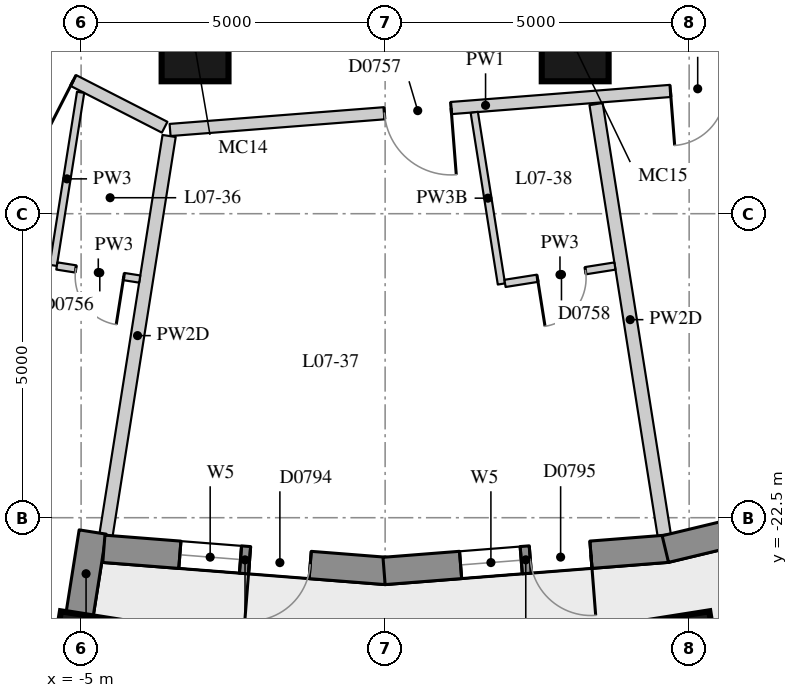
"""IFC4 building model, lengths in metres.
Left out: names, types, materials, properties, quantities, classifications, styles, units other than length and angle.
Written with IfcOpenShell. Run it as: python <this file> out.ifc"""

import sys

from ifc_helpers import new_model, si_unit, direction, frame, frame_2d, origin, origin_2d, place, context, subcontext, project, spatial, rectangle, extrude, element, fill, save


model = new_model("IFC4")
c1 = context("Model", 3, precision=1e-05, world=origin(), true_north=direction((0.0, 1.0)))
c2 = subcontext(c1, "Body", "Model", "MODEL_VIEW")
j1 = project(units=[si_unit("LENGTHUNIT", "METRE"), si_unit("PLANEANGLEUNIT", "RADIAN")], contexts=[c1])
p1 = place(None, origin())
s1 = spatial("IfcSite", under=j1, at=p1, CompositionType="ELEMENT")
p2 = place(p1, origin())
s2 = spatial("IfcBuilding", under=s1, at=p2, CompositionType="ELEMENT")
p3 = place(p2, frame((0.0, 0.0, 31.6)))
s3 = spatial("IfcBuildingStorey", under=s2, at=p3, CompositionType="ELEMENT", Elevation=31.6)
for number, where, z_axis, x_axis in (
    (1, (-4.906, -24.866, 0.0), (0.0, 0.0, 1.0), (-0.156, -0.988, 0.0)),
    (2, (4.906, -24.866, 0.0), (0.0, 0.0, 1.0), (0.156, -0.988, 0.0)),
):
    element("IfcColumn", number, at=place(p3, frame(where, z_axis=z_axis, x_axis=x_axis)), inside=s3, PredefinedType="COLUMN", context=c2, shape_type="SweptSolid", body=[
        extrude(rectangle(XDim=1.5, YDim=1.1, at=origin_2d()), origin(), (0.0, 0.0, 1.0), 3.3),
    ])
for number, where, z_axis, x_axis in (
    (3, (-3.126, -14.772, 0.0), (0.0, 0.0, 1.0), (1.0, 0.0, 0.0)),
    (4, (3.126, -14.772, 0.0), (0.0, 0.0, 1.0), (1.0, 0.0, 0.0)),
):
    element("IfcColumn", number, at=place(p3, frame(where, z_axis=z_axis, x_axis=x_axis)), inside=s3, PredefinedType="COLUMN", context=c2, shape_type="SweptSolid", body=[
        extrude(rectangle(XDim=1.1, YDim=1.1, at=origin_2d()), origin(), (0.0, 0.0, 1.0), 3.3),
    ])
p4 = place(p3, frame((-9.308, -24.35, 0.0), z_axis=(0.0, 0.0, 1.0), x_axis=(0.972496561493, -0.232917233979, 0.0)))
e5 = element("IfcWall", 5, at=p4, inside=s3, PredefinedType="SOLIDWALL", context=c2, shape_type="SweptSolid", body=[
    extrude(rectangle(XDim=3.911, YDim=0.45, at=frame_2d((1.956, 0.0))), origin(), (0.0, 0.0, 1.0), 3.02),
])
p5 = place(p4, frame((0.855, 0.0, 0.4)))
e6 = element("IfcOpeningElement", 6, at=p5, cuts=e5, PredefinedType="OPENING", context=c2, shape_type="SweptSolid", body=[
    extrude(rectangle(XDim=2.2, YDim=1.75, at=frame_2d((1.1, 0.875))), frame((0.0, 0.235, 0.0), z_axis=(0.0, -1.0, 0.0), x_axis=(1.0, 0.0, 0.0)), (0.0, 0.0, 1.0), 0.47),
])
p6 = place(p3, frame((-5.027, -24.108, 0.0), z_axis=(0.0, 0.0, 1.0), x_axis=(0.156133927791, 0.98773589415, 0.0)))
e7 = element("IfcWall", 7, at=p6, inside=s3, PredefinedType="SOLIDWALL", context=c2, shape_type="SweptSolid", body=[
    extrude(rectangle(XDim=1.39, YDim=0.45, at=frame_2d((0.695, 0.0))), origin(), (0.0, 0.0, 1.0), 2.47),
])
p7 = place(p3, frame((-4.626, -23.011, 0.0), z_axis=(0.0, 0.0, 1.0), x_axis=(0.996937095772, -0.078207589615, 0.0)))
e8 = element("IfcWall", 8, at=p7, inside=s3, PredefinedType="SOLIDWALL", context=c2, shape_type="SweptSolid", body=[
    extrude(rectangle(XDim=4.657, YDim=0.45, at=frame_2d((2.329, 0.0))), origin(), (0.0, 0.0, 1.0), 3.02),
])
p8 = place(p7, frame((1.254, 0.0, 0.4)))
e9 = element("IfcOpeningElement", 9, at=p8, cuts=e8, PredefinedType="OPENING", context=c2, shape_type="SweptSolid", body=[
    extrude(rectangle(XDim=1.0, YDim=1.75, at=frame_2d((0.5, 0.875))), frame((0.0, 0.235, 0.0), z_axis=(0.0, -1.0, 0.0), x_axis=(1.0, 0.0, 0.0)), (0.0, 0.0, 1.0), 0.47),
])
p9 = place(p7, frame((2.404, 0.0, 0.0)))
e10 = element("IfcOpeningElement", 10, at=p9, cuts=e8, PredefinedType="OPENING", context=c2, shape_type="SweptSolid", body=[
    extrude(rectangle(XDim=1.0, YDim=2.15, at=frame_2d((0.5, 1.075))), frame((0.0, 0.235, 0.0), z_axis=(0.0, -1.0, 0.0), x_axis=(1.0, 0.0, 0.0)), (0.0, 0.0, 1.0), 0.47),
])
p10 = place(p3, frame((-0.018, -23.376, 0.0), z_axis=(0.0, 0.0, 1.0), x_axis=(0.996935982964, 0.078221773648, 0.0)))
e11 = element("IfcWall", 11, at=p10, inside=s3, PredefinedType="SOLIDWALL", context=c2, shape_type="SweptSolid", body=[
    extrude(rectangle(XDim=4.676, YDim=0.45, at=frame_2d((2.338, 0.0))), origin(), (0.0, 0.0, 1.0), 3.02),
])
p11 = place(p10, frame((1.263, 0.0, 0.4)))
e12 = element("IfcOpeningElement", 12, at=p11, cuts=e11, PredefinedType="OPENING", context=c2, shape_type="SweptSolid", body=[
    extrude(rectangle(XDim=1.0, YDim=1.75, at=frame_2d((0.5, 0.875))), frame((0.0, 0.235, 0.0), z_axis=(0.0, -1.0, 0.0), x_axis=(1.0, 0.0, 0.0)), (0.0, 0.0, 1.0), 0.47),
])
p12 = place(p10, frame((2.413, 0.0, 0.0)))
e13 = element("IfcOpeningElement", 13, at=p12, cuts=e11, PredefinedType="OPENING", context=c2, shape_type="SweptSolid", body=[
    extrude(rectangle(XDim=1.0, YDim=2.15, at=frame_2d((0.5, 1.075))), frame((0.0, 0.235, 0.0), z_axis=(0.0, -1.0, 0.0), x_axis=(1.0, 0.0, 0.0)), (0.0, 0.0, 1.0), 0.47),
])
p13 = place(p3, frame((4.608, -23.016, 0.0), z_axis=(0.0, 0.0, 1.0), x_axis=(0.972343667289, 0.233554688847, 0.0)))
e14 = element("IfcWall", 14, at=p13, inside=s3, PredefinedType="SOLIDWALL", context=c2, shape_type="SweptSolid", body=[
    extrude(rectangle(XDim=4.624, YDim=0.45, at=frame_2d((2.312, 0.0))), origin(), (0.0, 0.0, 1.0), 3.02),
])
p14 = place(p13, frame((1.237, 0.0, 0.4)))
e15 = element("IfcOpeningElement", 15, at=p14, cuts=e14, PredefinedType="OPENING", context=c2, shape_type="SweptSolid", body=[
    extrude(rectangle(XDim=1.0, YDim=1.75, at=frame_2d((0.5, 0.875))), frame((0.0, 0.235, 0.0), z_axis=(0.0, -1.0, 0.0), x_axis=(1.0, 0.0, 0.0)), (0.0, 0.0, 1.0), 0.47),
])
p15 = place(p13, frame((2.387, 0.0, 0.0)))
e16 = element("IfcOpeningElement", 16, at=p15, cuts=e14, PredefinedType="OPENING", context=c2, shape_type="SweptSolid", body=[
    extrude(rectangle(XDim=1.0, YDim=2.15, at=frame_2d((0.5, 1.075))), frame((0.0, 0.235, 0.0), z_axis=(0.0, -1.0, 0.0), x_axis=(1.0, 0.0, 0.0)), (0.0, 0.0, 1.0), 0.47),
])
p16 = place(p3, frame((6.84, -15.313, 0.0), z_axis=(0.0, 0.0, 1.0), x_axis=(-0.996968882229, -0.077801335898, 0.0)))
e17 = element("IfcWall", 17, at=p16, inside=s3, PredefinedType="PARTITIONING", context=c2, shape_type="SweptSolid", body=[
    extrude(rectangle(XDim=10.409, YDim=0.2, at=frame_2d((5.204, 0.0))), origin(), (0.0, 0.0, 1.0), 3.02),
])
p17 = place(p16, frame((5.773, 0.0, 0.0)))
e18 = element("IfcOpeningElement", 18, at=p17, cuts=e17, PredefinedType="OPENING", context=c2, shape_type="SweptSolid", body=[
    extrude(rectangle(XDim=1.1, YDim=2.1, at=frame_2d((0.55, 1.05))), frame((0.0, 0.11, 0.0), z_axis=(0.0, -1.0, 0.0), x_axis=(1.0, 0.0, 0.0)), (0.0, 0.0, 1.0), 0.22),
])
p18 = place(p16, frame((1.255, 0.0, 0.0)))
e19 = element("IfcOpeningElement", 19, at=p18, cuts=e17, PredefinedType="OPENING", context=c2, shape_type="SweptSolid", body=[
    extrude(rectangle(XDim=0.9, YDim=2.1, at=frame_2d((0.45, 1.05))), frame((0.0, 0.11, 0.0), z_axis=(0.0, -1.0, 0.0), x_axis=(1.0, 0.0, 0.0)), (0.0, 0.0, 1.0), 0.22),
])
p19 = place(p3, frame((-3.626, -16.078, 0.0), z_axis=(0.0, 0.0, 1.0), x_axis=(-0.890197807844, 0.455574212297, 0.0)))
e20 = element("IfcWall", 20, at=p19, inside=s3, PredefinedType="PARTITIONING", context=c2, shape_type="SweptSolid", body=[
    extrude(rectangle(XDim=4.801, YDim=0.2, at=frame_2d((2.4, 0.0))), origin(), (0.0, 0.0, 1.0), 2.57),
])
p20 = place(p19, frame((1.688, 0.0, 0.0)))
e21 = element("IfcOpeningElement", 21, at=p20, cuts=e20, PredefinedType="OPENING", context=c2, shape_type="SweptSolid", body=[
    extrude(rectangle(XDim=1.0, YDim=2.1, at=frame_2d((0.5, 1.05))), frame((0.0, 0.11, 0.0), z_axis=(0.0, -1.0, 0.0), x_axis=(1.0, 0.0, 0.0)), (0.0, 0.0, 1.0), 0.22),
])
p21 = place(p3, frame((-4.591, -22.789, 0.0), z_axis=(0.0, 0.0, 1.0), x_axis=(0.156104000092, 0.987740624433, 0.0)))
e22 = element("IfcWall", 22, at=p21, inside=s3, PredefinedType="PARTITIONING", context=c2, shape_type="SweptSolid", body=[
    extrude(rectangle(XDim=6.648, YDim=0.22, at=frame_2d((3.324, 0.0))), origin(), (0.0, 0.0, 1.0), 2.47),
])
p22 = place(p3, frame((4.591, -22.789, 0.0), z_axis=(0.0, 0.0, 1.0), x_axis=(-0.156144168019, 0.987734275397, 0.0)))
e23 = element("IfcWall", 23, at=p22, inside=s3, PredefinedType="PARTITIONING", context=c2, shape_type="SweptSolid", body=[
    extrude(rectangle(XDim=7.18, YDim=0.22, at=frame_2d((3.59, 0.0))), origin(), (0.0, 0.0, 1.0), 2.47),
])
p23 = place(p3, frame((-5.008, -15.504, 0.0), z_axis=(0.0, 0.0, 1.0), x_axis=(-0.156219239615, -0.987722404917, 0.0)))
e24 = element("IfcWall", 24, at=p23, inside=s3, PredefinedType="PARTITIONING", context=c2, shape_type="SweptSolid", body=[
    extrude(rectangle(XDim=2.882, YDim=0.12, at=frame_2d((1.441, 0.0))), origin(), (0.0, 0.0, 1.0), 3.02),
])
p24 = place(p3, frame((1.466, -15.833, 0.0), z_axis=(0.0, 0.0, 1.0), x_axis=(0.156164367571, -0.987731081976, 0.0)))
e25 = element("IfcWall", 25, at=p24, inside=s3, PredefinedType="PARTITIONING", context=c2, shape_type="SweptSolid", body=[
    extrude(rectangle(XDim=2.858, YDim=0.12, at=frame_2d((1.429, 0.0))), origin(), (0.0, 0.0, 1.0), 2.47),
])
p25 = place(p3, frame((-5.399, -18.359, 0.0), z_axis=(0.0, 0.0, 1.0), x_axis=(0.987722767831, -0.156216945011, 0.0)))
e26 = element("IfcWall", 26, at=p25, inside=s3, PredefinedType="PARTITIONING", context=c2, shape_type="SweptSolid", body=[
    extrude(rectangle(XDim=1.38, YDim=0.12, at=frame_2d((0.69, 0.0))), origin(), (0.0, 0.0, 1.0), 3.02),
])
p26 = place(p25, frame((0.315, 0.0, 0.0)))
e27 = element("IfcOpeningElement", 27, at=p26, cuts=e26, PredefinedType="OPENING", context=c2, shape_type="SweptSolid", body=[
    extrude(rectangle(XDim=0.8, YDim=2.1, at=frame_2d((0.4, 1.05))), frame((0.0, 0.07, 0.0), z_axis=(0.0, -1.0, 0.0), x_axis=(1.0, 0.0, 0.0)), (0.0, 0.0, 1.0), 0.14),
])
p27 = place(p3, frame((1.972, -18.646, 0.0), z_axis=(0.0, 0.0, 1.0), x_axis=(0.98774348746, 0.156085883351, 0.0)))
e28 = element("IfcWall", 28, at=p27, inside=s3, PredefinedType="PARTITIONING", context=c2, shape_type="SweptSolid", body=[
    extrude(rectangle(XDim=1.83, YDim=0.12, at=frame_2d((0.915, 0.0))), origin(), (0.0, 0.0, 1.0), 3.02),
])
p28 = place(p27, frame((0.54, 0.0, 0.0)))
e29 = element("IfcOpeningElement", 29, at=p28, cuts=e28, PredefinedType="OPENING", context=c2, shape_type="SweptSolid", body=[
    extrude(rectangle(XDim=0.8, YDim=2.1, at=frame_2d((0.4, 1.05))), frame((0.0, 0.07, 0.0), z_axis=(0.0, -1.0, 0.0), x_axis=(1.0, 0.0, 0.0)), (0.0, 0.0, 1.0), 0.14),
])
p29 = place(p8, origin())
e30 = element("IfcWindow", 30, at=p29, inside=s3, PartitioningType="SINGLE_PANEL", PredefinedType="WINDOW", context=c2, shape_type="SweptSolid", body=[
    extrude(rectangle(XDim=1.0, YDim=1.75, at=frame_2d((0.5, 0.875))), frame((0.0, 0.035, 0.0), z_axis=(0.0, -1.0, 0.0), x_axis=(1.0, 0.0, 0.0)), (0.0, 0.0, 1.0), 0.06),
])
fill(e9, e30)
p30 = place(p9, frame((1.0, 0.0, 0.0), z_axis=(0.0, 0.0, 1.0), x_axis=(-1.0, 0.0, 0.0)))
e31 = element("IfcDoor", 31, at=p30, inside=s3, OperationType="SINGLE_SWING_RIGHT", PredefinedType="DOOR", context=c2, shape_type="SweptSolid", body=[
    extrude(rectangle(XDim=1.0, YDim=2.15, at=frame_2d((0.5, 1.075))), frame((0.0, 0.075, 0.0), z_axis=(0.0, -1.0, 0.0), x_axis=(1.0, 0.0, 0.0)), (0.0, 0.0, 1.0), 0.05),
])
fill(e10, e31)
p31 = place(p11, origin())
e32 = element("IfcWindow", 32, at=p31, inside=s3, PartitioningType="SINGLE_PANEL", PredefinedType="WINDOW", context=c2, shape_type="SweptSolid", body=[
    extrude(rectangle(XDim=1.0, YDim=1.75, at=frame_2d((0.5, 0.875))), frame((0.0, 0.035, 0.0), z_axis=(0.0, -1.0, 0.0), x_axis=(1.0, 0.0, 0.0)), (0.0, 0.0, 1.0), 0.06),
])
fill(e12, e32)
p32 = place(p12, frame((1.0, 0.0, 0.0), z_axis=(0.0, 0.0, 1.0), x_axis=(-1.0, 0.0, 0.0)))
e33 = element("IfcDoor", 33, at=p32, inside=s3, OperationType="SINGLE_SWING_LEFT", PredefinedType="DOOR", context=c2, shape_type="SweptSolid", body=[
    extrude(rectangle(XDim=1.0, YDim=2.15, at=frame_2d((0.5, 1.075))), frame((0.0, 0.075, 0.0), z_axis=(0.0, -1.0, 0.0), x_axis=(1.0, 0.0, 0.0)), (0.0, 0.0, 1.0), 0.05),
])
fill(e13, e33)
p33 = place(p20, origin())
e34 = element("IfcDoor", 34, at=p33, inside=s3, OperationType="SINGLE_SWING_LEFT", PredefinedType="DOOR", context=c2, shape_type="SweptSolid", body=[
    extrude(rectangle(XDim=1.0, YDim=2.1, at=frame_2d((0.5, 1.05))), frame((0.0, 0.025, 0.0), z_axis=(0.0, -1.0, 0.0), x_axis=(1.0, 0.0, 0.0)), (0.0, 0.0, 1.0), 0.05),
])
fill(e21, e34)
p34 = place(p26, origin())
e35 = element("IfcDoor", 35, at=p34, inside=s3, OperationType="SINGLE_SWING_LEFT", PredefinedType="DOOR", context=c2, shape_type="SweptSolid", body=[
    extrude(rectangle(XDim=0.8, YDim=2.1, at=frame_2d((0.4, 1.05))), frame((0.0, 0.025, 0.0), z_axis=(0.0, -1.0, 0.0), x_axis=(1.0, 0.0, 0.0)), (0.0, 0.0, 1.0), 0.05),
])
fill(e27, e35)
p35 = place(p17, origin())
e36 = element("IfcDoor", 36, at=p35, inside=s3, OperationType="SINGLE_SWING_LEFT", PredefinedType="DOOR", context=c2, shape_type="SweptSolid", body=[
    extrude(rectangle(XDim=1.1, YDim=2.1, at=frame_2d((0.55, 1.05))), frame((0.0, 0.025, 0.0), z_axis=(0.0, -1.0, 0.0), x_axis=(1.0, 0.0, 0.0)), (0.0, 0.0, 1.0), 0.05),
])
fill(e18, e36)
p36 = place(p28, origin())
e37 = element("IfcDoor", 37, at=p36, inside=s3, OperationType="SINGLE_SWING_RIGHT", PredefinedType="DOOR", context=c2, shape_type="SweptSolid", body=[
    extrude(rectangle(XDim=0.8, YDim=2.1, at=frame_2d((0.4, 1.05))), frame((0.0, 0.025, 0.0), z_axis=(0.0, -1.0, 0.0), x_axis=(1.0, 0.0, 0.0)), (0.0, 0.0, 1.0), 0.05),
])
fill(e29, e37)
p37 = place(p18, origin())
e38 = element("IfcDoor", 38, at=p37, inside=s3, OperationType="SINGLE_SWING_RIGHT", PredefinedType="DOOR", context=c2, shape_type="SweptSolid", body=[
    extrude(rectangle(XDim=0.9, YDim=2.1, at=frame_2d((0.45, 1.05))), frame((0.0, 0.025, 0.0), z_axis=(0.0, -1.0, 0.0), x_axis=(1.0, 0.0, 0.0)), (0.0, 0.0, 1.0), 0.05),
])
fill(e19, e38)
save(model, sys.argv[1])
